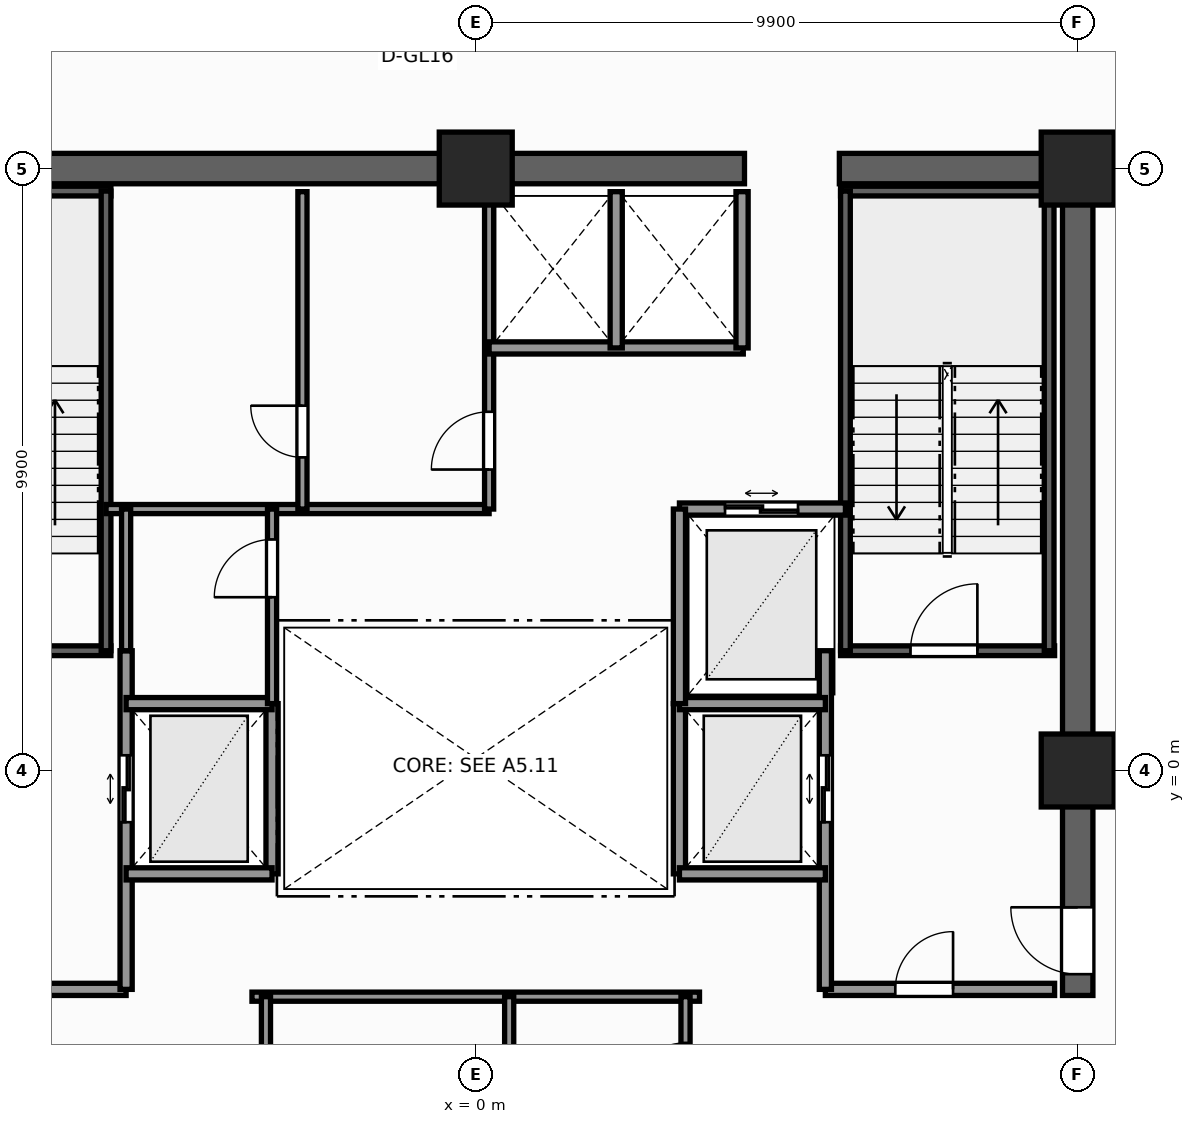
"""IFC4 building model, lengths in metres.
Left out: names, types, materials, properties, quantities, classifications, styles, units other than length and angle.
Written with IfcOpenShell. Run it as: python <this file> out.ifc"""

import sys

from ifc_helpers import new_model, si_unit, direction, frame, frame_2d, origin, origin_2d, place, context, subcontext, project, spatial, rectangle, extrude, element, fill, save


model = new_model("IFC4")
c1 = context("Model", 3, precision=1e-05, world=origin(), true_north=direction((0.0, 1.0)))
c2 = subcontext(c1, "Body", "Model", "MODEL_VIEW")
j1 = project(units=[si_unit("LENGTHUNIT", "METRE"), si_unit("PLANEANGLEUNIT", "RADIAN")], contexts=[c1])
p1 = place(None, origin())
s1 = spatial("IfcSite", under=j1, at=p1, CompositionType="ELEMENT")
p2 = place(p1, origin())
s2 = spatial("IfcBuilding", under=s1, at=p2, CompositionType="ELEMENT")
p3 = place(p2, frame((0.0, 0.0, 152.7)))
s3 = spatial("IfcBuildingStorey", under=s2, at=p3, CompositionType="ELEMENT", Elevation=152.7)
p4 = place(p3, frame((-10.15, 9.9, 0.0), z_axis=(0.0, 0.0, 1.0), x_axis=(1.0, 0.0, 0.0)))
e1 = element("IfcWall", 1, at=p4, inside=s3, PredefinedType="SHEAR", context=c2, shape_type="SweptSolid", body=[
    extrude(rectangle(XDim=14.57, YDim=0.5, at=frame_2d((7.285, 0.0))), origin(), (0.0, 0.0, 1.0), 4.2),
])
p5 = place(p3, frame((5.98, 9.9, 0.0), z_axis=(0.0, 0.0, 1.0), x_axis=(1.0, 0.0, 0.0)))
e2 = element("IfcWall", 2, at=p5, inside=s3, PredefinedType="SHEAR", context=c2, shape_type="SweptSolid", body=[
    extrude(rectangle(XDim=4.17, YDim=0.5, at=frame_2d((2.085, 0.0))), origin(), (0.0, 0.0, 1.0), 4.2),
])
p6 = place(p3, frame((9.9, -3.7, 0.0), z_axis=(0.0, 0.0, 1.0), x_axis=(0.0, 1.0, 0.0)))
e3 = element("IfcWall", 3, at=p6, inside=s3, PredefinedType="SHEAR", context=c2, shape_type="SweptSolid", body=[
    extrude(rectangle(XDim=13.35, YDim=0.5, at=frame_2d((6.675, 0.0))), origin(), (0.0, 0.0, 1.0), 4.2),
])
p7 = place(p6, frame((0.35, 0.0, 0.0)))
e4 = element("IfcOpeningElement", 4, at=p7, cuts=e3, PredefinedType="OPENING", context=c2, shape_type="SweptSolid", body=[
    extrude(rectangle(XDim=1.1, YDim=2.2, at=frame_2d((0.55, 1.1))), frame((0.0, 0.26, 0.0), z_axis=(0.0, -1.0, 0.0), x_axis=(1.0, 0.0, 0.0)), (0.0, 0.0, 1.0), 0.52),
])
for number, where, z_axis, x_axis in (
    (5, (9.9, 9.9, 0.0), (0.0, 0.0, 1.0), (1.0, 0.0, 0.0)),
    (6, (9.9, 0.0, 0.0), (0.0, 0.0, 1.0), (1.0, 0.0, 0.0)),
    (7, (0.0, 9.9, 0.0), (0.0, 0.0, 1.0), (1.0, 0.0, 0.0)),
):
    element("IfcColumn", number, at=place(p3, frame(where, z_axis=z_axis, x_axis=x_axis)), inside=s3, PredefinedType="COLUMN", context=c2, shape_type="SweptSolid", body=[
        extrude(rectangle(XDim=1.2, YDim=1.2, at=origin_2d()), origin(), (0.0, 0.0, 1.0), 4.2),
    ])
p8 = place(p3, frame((-9.52, 1.97, 0.0), z_axis=(0.0, 0.0, 1.0), x_axis=(1.0, 0.0, 0.0)))
e8 = element("IfcWall", 8, at=p8, inside=s3, PredefinedType="SHEAR", context=c2, shape_type="SweptSolid", body=[
    extrude(rectangle(XDim=3.52, YDim=0.16, at=frame_2d((1.76, 0.0))), origin(), (0.0, 0.0, 1.0), 4.2),
])
p9 = place(p8, frame((1.15, 0.0, 0.0)))
e9 = element("IfcOpeningElement", 9, at=p9, cuts=e8, PredefinedType="OPENING", context=c2, shape_type="SweptSolid", body=[
    extrude(rectangle(XDim=1.1, YDim=2.2, at=frame_2d((0.55, 1.1))), frame((0.0, 0.09, 0.0), z_axis=(0.0, -1.0, 0.0), x_axis=(1.0, 0.0, 0.0)), (0.0, 0.0, 1.0), 0.18),
])
p10 = place(p3, frame((-9.52, 9.53, 0.0), z_axis=(0.0, 0.0, 1.0), x_axis=(1.0, 0.0, 0.0)))
e10 = element("IfcWall", 10, at=p10, inside=s3, PredefinedType="SHEAR", context=c2, shape_type="SweptSolid", body=[
    extrude(rectangle(XDim=3.52, YDim=0.16, at=frame_2d((1.76, 0.0))), origin(), (0.0, 0.0, 1.0), 4.2),
])
p11 = place(p3, frame((-6.08, 1.97, 0.0), z_axis=(0.0, 0.0, 1.0), x_axis=(0.0, 1.0, 0.0)))
e11 = element("IfcWall", 11, at=p11, inside=s3, PredefinedType="SHEAR", context=c2, shape_type="SweptSolid", body=[
    extrude(rectangle(XDim=7.56, YDim=0.16, at=frame_2d((3.78, 0.0))), origin(), (0.0, 0.0, 1.0), 4.2),
])
p12 = place(p3, frame((6.0, 1.97, 0.0), z_axis=(0.0, 0.0, 1.0), x_axis=(1.0, 0.0, 0.0)))
e12 = element("IfcWall", 12, at=p12, inside=s3, PredefinedType="SHEAR", context=c2, shape_type="SweptSolid", body=[
    extrude(rectangle(XDim=3.52, YDim=0.16, at=frame_2d((1.76, 0.0))), origin(), (0.0, 0.0, 1.0), 4.2),
])
p13 = place(p12, frame((1.15, 0.0, 0.0)))
e13 = element("IfcOpeningElement", 13, at=p13, cuts=e12, PredefinedType="OPENING", context=c2, shape_type="SweptSolid", body=[
    extrude(rectangle(XDim=1.1, YDim=2.2, at=frame_2d((0.55, 1.1))), frame((0.0, 0.09, 0.0), z_axis=(0.0, -1.0, 0.0), x_axis=(1.0, 0.0, 0.0)), (0.0, 0.0, 1.0), 0.18),
])
p14 = place(p3, frame((6.0, 9.53, 0.0), z_axis=(0.0, 0.0, 1.0), x_axis=(1.0, 0.0, 0.0)))
e14 = element("IfcWall", 14, at=p14, inside=s3, PredefinedType="SHEAR", context=c2, shape_type="SweptSolid", body=[
    extrude(rectangle(XDim=3.52, YDim=0.16, at=frame_2d((1.76, 0.0))), origin(), (0.0, 0.0, 1.0), 4.2),
])
for number, where, z_axis, x_axis in (
    (15, (6.08, 1.97, 0.0), (0.0, 0.0, 1.0), (0.0, 1.0, 0.0)),
    (16, (9.43, 1.97, 0.0), (0.0, 0.0, 1.0), (0.0, 1.0, 0.0)),
):
    element("IfcWall", number, at=place(p3, frame(where, z_axis=z_axis, x_axis=x_axis)), inside=s3, PredefinedType="SHEAR", context=c2, shape_type="SweptSolid", body=[
        extrude(rectangle(XDim=7.56, YDim=0.16, at=frame_2d((3.78, 0.0))), origin(), (0.0, 0.0, 1.0), 4.2),
    ])
p15 = place(p3, frame((-9.52, -3.6, 0.0), z_axis=(0.0, 0.0, 1.0), x_axis=(1.0, 0.0, 0.0)))
e17 = element("IfcWall", 17, at=p15, inside=s3, PredefinedType="SOLIDWALL", context=c2, shape_type="SweptSolid", body=[
    extrude(rectangle(XDim=3.77, YDim=0.2, at=frame_2d((1.885, 0.0))), origin(), (0.0, 0.0, 1.0), 4.0),
])
p16 = place(p15, frame((1.15, 0.0, 0.0)))
e18 = element("IfcOpeningElement", 18, at=p16, cuts=e17, PredefinedType="OPENING", context=c2, shape_type="SweptSolid", body=[
    extrude(rectangle(XDim=0.95, YDim=2.06, at=frame_2d((0.475, 1.03))), frame((0.0, 0.11, 0.0), z_axis=(0.0, -1.0, 0.0), x_axis=(1.0, 0.0, 0.0)), (0.0, 0.0, 1.0), 0.22),
])
p17 = place(p3, frame((-5.75, -3.6, 0.0), z_axis=(0.0, 0.0, 1.0), x_axis=(0.0, 1.0, 0.0)))
e19 = element("IfcWall", 19, at=p17, inside=s3, PredefinedType="SOLIDWALL", context=c2, shape_type="SweptSolid", body=[
    extrude(rectangle(XDim=5.57, YDim=0.2, at=frame_2d((2.785, 0.0))), origin(), (0.0, 0.0, 1.0), 3.635),
])
p18 = place(p17, frame((2.75, 0.0, 0.0)))
e20 = element("IfcOpeningElement", 20, at=p18, cuts=e19, PredefinedType="OPENING", context=c2, shape_type="SweptSolid", body=[
    extrude(rectangle(XDim=1.1, YDim=2.2, at=frame_2d((0.55, 1.1))), frame((0.0, 0.11, 0.0), z_axis=(0.0, -1.0, 0.0), x_axis=(1.0, 0.0, 0.0)), (0.0, 0.0, 1.0), 0.22),
])
p19 = place(p3, frame((-3.35, -1.7, 0.0), z_axis=(0.0, 0.0, 1.0), x_axis=(0.0, 1.0, 0.0)))
e21 = element("IfcWall", 21, at=p19, inside=s3, PredefinedType="SOLIDWALL", context=c2, shape_type="SweptSolid", body=[
    extrude(rectangle(XDim=2.8, YDim=0.2, at=frame_2d((1.4, 0.0))), origin(), (0.0, 0.0, 1.0), 3.635),
])
for number, where, z_axis, x_axis in (
    (22, (-5.75, -1.7, 0.0), (0.0, 0.0, 1.0), (1.0, 0.0, 0.0)),
    (23, (-5.75, 1.1, 0.0), (0.0, 0.0, 1.0), (1.0, 0.0, 0.0)),
):
    element("IfcWall", number, at=place(p3, frame(where, z_axis=z_axis, x_axis=x_axis)), inside=s3, PredefinedType="SOLIDWALL", context=c2, shape_type="SweptSolid", body=[
        extrude(rectangle(XDim=2.4, YDim=0.2, at=frame_2d((1.2, 0.0))), origin(), (0.0, 0.0, 1.0), 4.0),
    ])
p20 = place(p3, frame((5.75, -3.6, 0.0), z_axis=(0.0, 0.0, 1.0), x_axis=(1.0, 0.0, 0.0)))
e24 = element("IfcWall", 24, at=p20, inside=s3, PredefinedType="SOLIDWALL", context=c2, shape_type="SweptSolid", body=[
    extrude(rectangle(XDim=3.77, YDim=0.2, at=frame_2d((1.885, 0.0))), origin(), (0.0, 0.0, 1.0), 4.0),
])
p21 = place(p20, frame((1.15, 0.0, 0.0)))
e25 = element("IfcOpeningElement", 25, at=p21, cuts=e24, PredefinedType="OPENING", context=c2, shape_type="SweptSolid", body=[
    extrude(rectangle(XDim=0.95, YDim=2.06, at=frame_2d((0.475, 1.03))), frame((0.0, 0.11, 0.0), z_axis=(0.0, -1.0, 0.0), x_axis=(1.0, 0.0, 0.0)), (0.0, 0.0, 1.0), 0.22),
])
p22 = place(p3, frame((5.75, -3.6, 0.0), z_axis=(0.0, 0.0, 1.0), x_axis=(0.0, 1.0, 0.0)))
e26 = element("IfcWall", 26, at=p22, inside=s3, PredefinedType="SOLIDWALL", context=c2, shape_type="SweptSolid", body=[
    extrude(rectangle(XDim=5.57, YDim=0.2, at=frame_2d((2.785, 0.0))), origin(), (0.0, 0.0, 1.0), 3.635),
])
p23 = place(p22, frame((2.75, 0.0, 0.0)))
e27 = element("IfcOpeningElement", 27, at=p23, cuts=e26, PredefinedType="OPENING", context=c2, shape_type="SweptSolid", body=[
    extrude(rectangle(XDim=1.1, YDim=2.2, at=frame_2d((0.55, 1.1))), frame((0.0, 0.11, 0.0), z_axis=(0.0, -1.0, 0.0), x_axis=(1.0, 0.0, 0.0)), (0.0, 0.0, 1.0), 0.22),
])
p24 = place(p3, frame((3.35, -1.7, 0.0), z_axis=(0.0, 0.0, 1.0), x_axis=(0.0, 1.0, 0.0)))
e28 = element("IfcWall", 28, at=p24, inside=s3, PredefinedType="SOLIDWALL", context=c2, shape_type="SweptSolid", body=[
    extrude(rectangle(XDim=2.8, YDim=0.2, at=frame_2d((1.4, 0.0))), origin(), (0.0, 0.0, 1.0), 3.635),
])
for number, where, z_axis, x_axis in (
    (29, (3.35, -1.7, 0.0), (0.0, 0.0, 1.0), (1.0, 0.0, 0.0)),
    (30, (3.35, 1.1, 0.0), (0.0, 0.0, 1.0), (1.0, 0.0, 0.0)),
):
    element("IfcWall", number, at=place(p3, frame(where, z_axis=z_axis, x_axis=x_axis)), inside=s3, PredefinedType="SOLIDWALL", context=c2, shape_type="SweptSolid", body=[
        extrude(rectangle(XDim=2.4, YDim=0.2, at=frame_2d((1.2, 0.0))), origin(), (0.0, 0.0, 1.0), 4.0),
    ])
p25 = place(p3, frame((3.35, 4.3, 0.0), z_axis=(0.0, 0.0, 1.0), x_axis=(1.0, 0.0, 0.0)))
e31 = element("IfcWall", 31, at=p25, inside=s3, PredefinedType="SOLIDWALL", context=c2, shape_type="SweptSolid", body=[
    extrude(rectangle(XDim=2.73, YDim=0.2, at=frame_2d((1.365, 0.0))), origin(), (0.0, 0.0, 1.0), 4.0),
])
p26 = place(p25, frame((0.75, 0.0, 0.0)))
e32 = element("IfcOpeningElement", 32, at=p26, cuts=e31, PredefinedType="OPENING", context=c2, shape_type="SweptSolid", body=[
    extrude(rectangle(XDim=1.2, YDim=2.25, at=frame_2d((0.6, 1.125))), frame((0.0, 0.11, 0.0), z_axis=(0.0, -1.0, 0.0), x_axis=(1.0, 0.0, 0.0)), (0.0, 0.0, 1.0), 0.22),
])
p27 = place(p3, frame((3.35, 1.1, 0.0), z_axis=(0.0, 0.0, 1.0), x_axis=(0.0, 1.0, 0.0)))
e33 = element("IfcWall", 33, at=p27, inside=s3, PredefinedType="SOLIDWALL", context=c2, shape_type="SweptSolid", body=[
    extrude(rectangle(XDim=3.2, YDim=0.2, at=frame_2d((1.6, 0.0))), origin(), (0.0, 0.0, 1.0), 3.635),
])
p28 = place(p3, frame((-6.08, 4.3, 0.0), z_axis=(0.0, 0.0, 1.0), x_axis=(1.0, 0.0, 0.0)))
e34 = element("IfcWall", 34, at=p28, inside=s3, PredefinedType="PARTITIONING", context=c2, shape_type="SweptSolid", body=[
    extrude(rectangle(XDim=6.3, YDim=0.15, at=frame_2d((3.15, 0.0))), origin(), (0.0, 0.0, 1.0), 4.0),
])
p29 = place(p3, frame((0.22, 4.3, 0.0), z_axis=(0.0, 0.0, 1.0), x_axis=(0.0, 1.0, 0.0)))
e35 = element("IfcWall", 35, at=p29, inside=s3, PredefinedType="PARTITIONING", context=c2, shape_type="SweptSolid", body=[
    extrude(rectangle(XDim=5.22, YDim=0.15, at=frame_2d((2.61, 0.0))), origin(), (0.0, 0.0, 1.0), 4.0),
])
p30 = place(p29, frame((0.65, 0.0, 0.0)))
e36 = element("IfcOpeningElement", 36, at=p30, cuts=e35, PredefinedType="OPENING", context=c2, shape_type="SweptSolid", body=[
    extrude(rectangle(XDim=0.95, YDim=2.06, at=frame_2d((0.475, 1.03))), frame((0.0, 0.085, 0.0), z_axis=(0.0, -1.0, 0.0), x_axis=(1.0, 0.0, 0.0)), (0.0, 0.0, 1.0), 0.17),
])
p31 = place(p3, frame((-2.85, 4.3, 0.0), z_axis=(0.0, 0.0, 1.0), x_axis=(0.0, 1.0, 0.0)))
e37 = element("IfcWall", 37, at=p31, inside=s3, PredefinedType="PARTITIONING", context=c2, shape_type="SweptSolid", body=[
    extrude(rectangle(XDim=5.22, YDim=0.15, at=frame_2d((2.61, 0.0))), origin(), (0.0, 0.0, 1.0), 4.0),
])
p32 = place(p31, frame((0.85, 0.0, 0.0)))
e38 = element("IfcOpeningElement", 38, at=p32, cuts=e37, PredefinedType="OPENING", context=c2, shape_type="SweptSolid", body=[
    extrude(rectangle(XDim=0.85, YDim=2.03, at=frame_2d((0.425, 1.015))), frame((0.0, 0.085, 0.0), z_axis=(0.0, -1.0, 0.0), x_axis=(1.0, 0.0, 0.0)), (0.0, 0.0, 1.0), 0.17),
])
p33 = place(p3, frame((0.22, 6.95, 0.0), z_axis=(0.0, 0.0, 1.0), x_axis=(1.0, 0.0, 0.0)))
e39 = element("IfcWall", 39, at=p33, inside=s3, PredefinedType="SOLIDWALL", context=c2, shape_type="SweptSolid", body=[
    extrude(rectangle(XDim=4.18, YDim=0.2, at=frame_2d((2.09, 0.0))), origin(), (0.0, 0.0, 1.0), 4.0),
])
for number, where, z_axis, x_axis in (
    (40, (4.38, 6.95, 0.0), (0.0, 0.0, 1.0), (0.0, 1.0, 0.0)),
    (41, (2.31, 6.95, 0.0), (0.0, 0.0, 1.0), (0.0, 1.0, 0.0)),
):
    element("IfcWall", number, at=place(p3, frame(where, z_axis=z_axis, x_axis=x_axis)), inside=s3, PredefinedType="SOLIDWALL", context=c2, shape_type="SweptSolid", body=[
        extrude(rectangle(XDim=2.57, YDim=0.2, at=frame_2d((1.285, 0.0))), origin(), (0.0, 0.0, 1.0), 4.0),
    ])
p34 = place(p3, frame((-3.68, -3.72, 0.0), z_axis=(0.0, 0.0, 1.0), x_axis=(1.0, 0.0, 0.0)))
e42 = element("IfcWall", 42, at=p34, inside=s3, PredefinedType="PARTITIONING", context=c2, shape_type="SweptSolid", body=[
    extrude(rectangle(XDim=7.36, YDim=0.15, at=frame_2d((3.68, 0.0))), origin(), (0.0, 0.0, 1.0), 4.0),
])
p35 = place(p3, frame((3.45, -6.08, 0.0), z_axis=(0.0, 0.0, 1.0), x_axis=(0.0, 1.0, 0.0)))
e43 = element("IfcWall", 43, at=p35, inside=s3, PredefinedType="PARTITIONING", context=c2, shape_type="SweptSolid", body=[
    extrude(rectangle(XDim=2.36, YDim=0.15, at=frame_2d((1.18, 0.0))), origin(), (0.0, 0.0, 1.0), 4.0),
])
p36 = place(p35, frame((0.65, 0.0, 0.0)))
e44 = element("IfcOpeningElement", 44, at=p36, cuts=e43, PredefinedType="OPENING", context=c2, shape_type="SweptSolid", body=[
    extrude(rectangle(XDim=0.95, YDim=2.06, at=frame_2d((0.475, 1.03))), frame((0.0, 0.085, 0.0), z_axis=(0.0, -1.0, 0.0), x_axis=(1.0, 0.0, 0.0)), (0.0, 0.0, 1.0), 0.17),
])
p37 = place(p3, frame((-3.45, -6.08, 0.0), z_axis=(0.0, 0.0, 1.0), x_axis=(0.0, 1.0, 0.0)))
e45 = element("IfcWall", 45, at=p37, inside=s3, PredefinedType="PARTITIONING", context=c2, shape_type="SweptSolid", body=[
    extrude(rectangle(XDim=2.36, YDim=0.15, at=frame_2d((1.18, 0.0))), origin(), (0.0, 0.0, 1.0), 4.0),
])
p38 = place(p3, frame((0.55, -6.08, 0.0), z_axis=(0.0, 0.0, 1.0), x_axis=(0.0, 1.0, 0.0)))
e46 = element("IfcWall", 46, at=p38, inside=s3, PredefinedType="PARTITIONING", context=c2, shape_type="SweptSolid", body=[
    extrude(rectangle(XDim=2.36, YDim=0.15, at=frame_2d((1.18, 0.0))), origin(), (0.0, 0.0, 1.0), 4.0),
])
p39 = place(p38, frame((0.65, 0.0, 0.0)))
e47 = element("IfcOpeningElement", 47, at=p39, cuts=e46, PredefinedType="OPENING", context=c2, shape_type="SweptSolid", body=[
    extrude(rectangle(XDim=0.9, YDim=2.06, at=frame_2d((0.45, 1.03))), frame((0.0, 0.085, 0.0), z_axis=(0.0, -1.0, 0.0), x_axis=(1.0, 0.0, 0.0)), (0.0, 0.0, 1.0), 0.17),
])
p40 = place(p3, frame((-3.35, 1.1, 0.0), z_axis=(0.0, 0.0, 1.0), x_axis=(0.0, 1.0, 0.0)))
e48 = element("IfcWall", 48, at=p40, inside=s3, PredefinedType="PARTITIONING", context=c2, shape_type="SweptSolid", body=[
    extrude(rectangle(XDim=3.2, YDim=0.15, at=frame_2d((1.6, 0.0))), origin(), (0.0, 0.0, 1.0), 3.635),
])
p41 = place(p40, frame((1.75, 0.0, 0.0)))
e49 = element("IfcOpeningElement", 49, at=p41, cuts=e48, PredefinedType="OPENING", context=c2, shape_type="SweptSolid", body=[
    extrude(rectangle(XDim=0.95, YDim=2.06, at=frame_2d((0.475, 1.03))), frame((0.0, 0.085, 0.0), z_axis=(0.0, -1.0, 0.0), x_axis=(1.0, 0.0, 0.0)), (0.0, 0.0, 1.0), 0.17),
])
p42 = place(p3, frame((-5.75, 1.97, 0.0), z_axis=(0.0, 0.0, 1.0), x_axis=(0.0, 1.0, 0.0)))
e50 = element("IfcWall", 50, at=p42, inside=s3, PredefinedType="PARTITIONING", context=c2, shape_type="SweptSolid", body=[
    extrude(rectangle(XDim=2.33, YDim=0.15, at=frame_2d((1.165, 0.0))), origin(), (0.0, 0.0, 1.0), 3.635),
])
p43 = place(p13, origin())
e51 = element("IfcDoor", 51, at=p43, inside=s3, OperationType="SINGLE_SWING_RIGHT", PredefinedType="DOOR", context=c2, shape_type="SweptSolid", body=[
    extrude(rectangle(XDim=1.1, YDim=2.2, at=frame_2d((0.55, 1.1))), frame((0.0, 0.025, 0.0), z_axis=(0.0, -1.0, 0.0), x_axis=(1.0, 0.0, 0.0)), (0.0, 0.0, 1.0), 0.05),
])
fill(e13, e51)
p44 = place(p18, origin())
e52 = element("IfcDoor", 52, at=p44, inside=s3, OperationType="DOUBLE_DOOR_SLIDING", PredefinedType="DOOR", context=c2, shape_type="SweptSolid", body=[
    extrude(rectangle(XDim=1.1, YDim=2.2, at=frame_2d((0.55, 1.1))), frame((0.0, 0.025, 0.0), z_axis=(0.0, -1.0, 0.0), x_axis=(1.0, 0.0, 0.0)), (0.0, 0.0, 1.0), 0.05),
])
fill(e20, e52)
p45 = place(p7, origin())
e53 = element("IfcDoor", 53, at=p45, inside=s3, OperationType="SINGLE_SWING_RIGHT", PredefinedType="DOOR", context=c2, shape_type="SweptSolid", body=[
    extrude(rectangle(XDim=1.1, YDim=2.2, at=frame_2d((0.55, 1.1))), frame((0.0, 0.025, 0.0), z_axis=(0.0, -1.0, 0.0), x_axis=(1.0, 0.0, 0.0)), (0.0, 0.0, 1.0), 0.05),
])
fill(e4, e53)
p46 = place(p23, origin())
e54 = element("IfcDoor", 54, at=p46, inside=s3, OperationType="DOUBLE_DOOR_SLIDING", PredefinedType="DOOR", context=c2, shape_type="SweptSolid", body=[
    extrude(rectangle(XDim=1.1, YDim=2.2, at=frame_2d((0.55, 1.1))), frame((0.0, 0.025, 0.0), z_axis=(0.0, -1.0, 0.0), x_axis=(1.0, 0.0, 0.0)), (0.0, 0.0, 1.0), 0.05),
])
fill(e27, e54)
p47 = place(p26, origin())
e55 = element("IfcDoor", 55, at=p47, inside=s3, OperationType="DOUBLE_DOOR_SLIDING", PredefinedType="DOOR", context=c2, shape_type="SweptSolid", body=[
    extrude(rectangle(XDim=1.2, YDim=2.25, at=frame_2d((0.6, 1.125))), frame((0.0, 0.025, 0.0), z_axis=(0.0, -1.0, 0.0), x_axis=(1.0, 0.0, 0.0)), (0.0, 0.0, 1.0), 0.05),
])
fill(e32, e55)
p48 = place(p30, origin())
e56 = element("IfcDoor", 56, at=p48, inside=s3, OperationType="SINGLE_SWING_LEFT", PredefinedType="DOOR", context=c2, shape_type="SweptSolid", body=[
    extrude(rectangle(XDim=0.95, YDim=2.06, at=frame_2d((0.475, 1.03))), frame((0.0, 0.025, 0.0), z_axis=(0.0, -1.0, 0.0), x_axis=(1.0, 0.0, 0.0)), (0.0, 0.0, 1.0), 0.05),
])
fill(e36, e56)
p49 = place(p32, origin())
e57 = element("IfcDoor", 57, at=p49, inside=s3, OperationType="SINGLE_SWING_RIGHT", PredefinedType="DOOR", context=c2, shape_type="SweptSolid", body=[
    extrude(rectangle(XDim=0.85, YDim=2.03, at=frame_2d((0.425, 1.015))), frame((0.0, 0.025, 0.0), z_axis=(0.0, -1.0, 0.0), x_axis=(1.0, 0.0, 0.0)), (0.0, 0.0, 1.0), 0.05),
])
fill(e38, e57)
p50 = place(p21, origin())
e58 = element("IfcDoor", 58, at=p50, inside=s3, OperationType="SINGLE_SWING_RIGHT", PredefinedType="DOOR", context=c2, shape_type="SweptSolid", body=[
    extrude(rectangle(XDim=0.95, YDim=2.06, at=frame_2d((0.475, 1.03))), frame((0.0, 0.025, 0.0), z_axis=(0.0, -1.0, 0.0), x_axis=(1.0, 0.0, 0.0)), (0.0, 0.0, 1.0), 0.05),
])
fill(e25, e58)
p51 = place(p36, origin())
e59 = element("IfcDoor", 59, at=p51, inside=s3, OperationType="SINGLE_SWING_LEFT", PredefinedType="DOOR", context=c2, shape_type="SweptSolid", body=[
    extrude(rectangle(XDim=0.95, YDim=2.06, at=frame_2d((0.475, 1.03))), frame((0.0, 0.025, 0.0), z_axis=(0.0, -1.0, 0.0), x_axis=(1.0, 0.0, 0.0)), (0.0, 0.0, 1.0), 0.05),
])
fill(e44, e59)
p52 = place(p41, origin())
e60 = element("IfcDoor", 60, at=p52, inside=s3, OperationType="SINGLE_SWING_LEFT", PredefinedType="DOOR", context=c2, shape_type="SweptSolid", body=[
    extrude(rectangle(XDim=0.95, YDim=2.06, at=frame_2d((0.475, 1.03))), frame((0.0, 0.025, 0.0), z_axis=(0.0, -1.0, 0.0), x_axis=(1.0, 0.0, 0.0)), (0.0, 0.0, 1.0), 0.05),
])
fill(e49, e60)
save(model, sys.argv[1])
